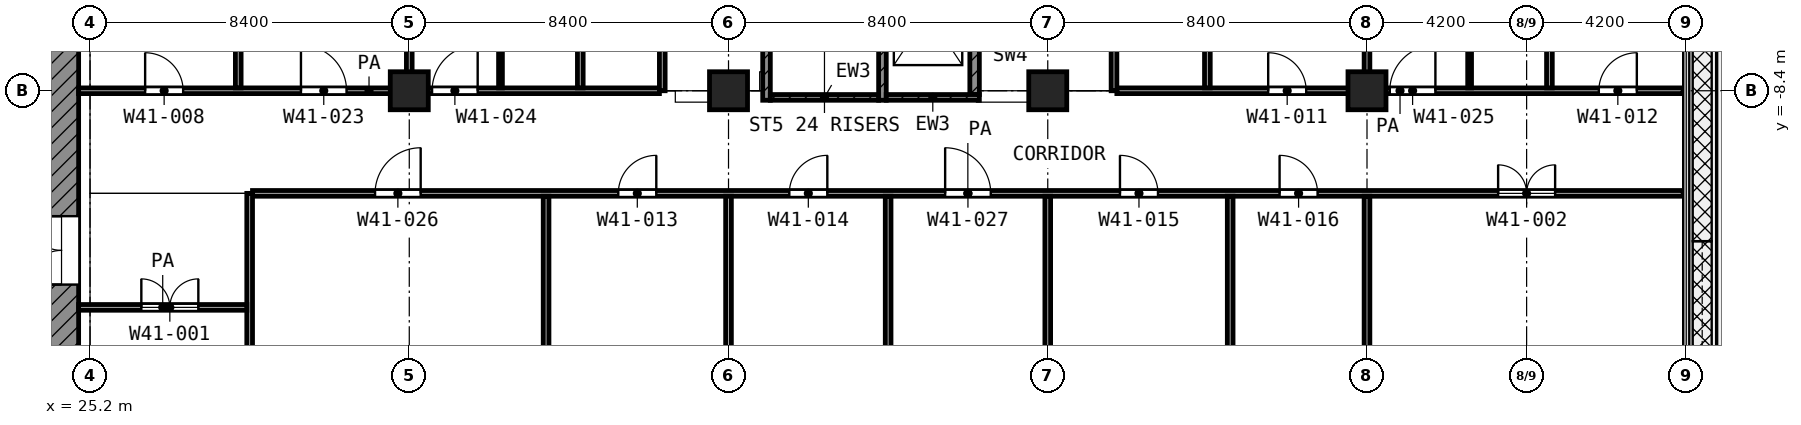
"""IFC4 building model, lengths in metres.
Left out: names, types, materials, properties, quantities, classifications, styles, units other than length and angle.
Written with IfcOpenShell. Run it as: python <this file> out.ifc"""

import sys

from ifc_helpers import new_model, si_unit, direction, frame, frame_2d, origin, origin_2d, place, context, subcontext, project, spatial, rectangle, extrude, element, fill, save


model = new_model("IFC4")
c1 = context("Model", 3, precision=1e-05, world=origin(), true_north=direction((0.0, 1.0)))
c2 = subcontext(c1, "Body", "Model", "MODEL_VIEW")
j1 = project(units=[si_unit("LENGTHUNIT", "METRE"), si_unit("PLANEANGLEUNIT", "RADIAN")], contexts=[c1])
p1 = place(None, origin())
s1 = spatial("IfcSite", under=j1, at=p1, CompositionType="ELEMENT")
p2 = place(p1, origin())
s2 = spatial("IfcBuilding", under=s1, at=p2, CompositionType="ELEMENT")
p3 = place(p2, frame((0.0, 0.0, 200.4)))
s3 = spatial("IfcBuildingStorey", under=s2, at=p3, CompositionType="ELEMENT", Elevation=200.4)
for number, where, z_axis, x_axis in (
    (1, (33.6, -8.4, 0.0), (0.0, 0.0, 1.0), (1.0, 0.0, 0.0)),
    (2, (42.0, -8.4, 0.0), (0.0, 0.0, 1.0), (1.0, 0.0, 0.0)),
    (3, (50.4, -8.4, 0.0), (0.0, 0.0, 1.0), (1.0, 0.0, 0.0)),
    (4, (58.8, -8.4, 0.0), (0.0, 0.0, 1.0), (1.0, 0.0, 0.0)),
):
    element("IfcColumn", number, at=place(p3, frame(where, z_axis=z_axis, x_axis=x_axis)), inside=s3, PredefinedType="COLUMN", context=c2, shape_type="SweptSolid", body=[
        extrude(rectangle(XDim=1.0, YDim=1.0, at=origin_2d()), origin(), (0.0, 0.0, 1.0), 4.2),
    ])
p4 = place(p3, frame((24.45, -24.0, 0.0), z_axis=(0.0, 0.0, 1.0), x_axis=(0.0, 1.0, 0.0)))
e5 = element("IfcWall", 5, at=p4, inside=s3, PredefinedType="SHEAR", context=c2, shape_type="SweptSolid", body=[
    extrude(rectangle(XDim=18.6, YDim=0.9, at=frame_2d((9.3, 0.0))), origin(), (0.0, 0.0, 1.0), 3.6),
])
p5 = place(p4, frame((10.5, 0.0, 0.0)))
e6 = element("IfcOpeningElement", 6, at=p5, cuts=e5, PredefinedType="OPENING", context=c2, shape_type="SweptSolid", body=[
    extrude(rectangle(XDim=1.8, YDim=2.1, at=frame_2d((0.9, 1.05))), frame((0.0, 0.46, 0.0), z_axis=(0.0, -1.0, 0.0), x_axis=(1.0, 0.0, 0.0)), (0.0, 0.0, 1.0), 0.92),
])
p6 = place(p3, frame((43.0, -8.65, 0.0), z_axis=(0.0, 0.0, 1.0), x_axis=(0.0, 1.0, 0.0)))
e7 = element("IfcWall", 7, at=p6, inside=s3, PredefinedType="SHEAR", context=c2, shape_type="SweptSolid", body=[
    extrude(rectangle(XDim=8.35, YDim=0.2, at=frame_2d((4.175, 0.0))), origin(), (0.0, 0.0, 1.0), 3.6),
])
p7 = place(p6, frame((7.0, 0.0, 0.0)))
e8 = element("IfcOpeningElement", 8, at=p7, cuts=e7, PredefinedType="OPENING", context=c2, shape_type="SweptSolid", body=[
    extrude(rectangle(XDim=1.1, YDim=2.1, at=frame_2d((0.55, 1.05))), frame((0.0, 0.11, 0.0), z_axis=(0.0, -1.0, 0.0), x_axis=(1.0, 0.0, 0.0)), (0.0, 0.0, 1.0), 0.22),
])
p8 = place(p3, frame((46.05, -8.65, 0.0), z_axis=(0.0, 0.0, 1.0), x_axis=(0.0, 1.0, 0.0)))
e9 = element("IfcWall", 9, at=p8, inside=s3, PredefinedType="SHEAR", context=c2, shape_type="SweptSolid", body=[
    extrude(rectangle(XDim=8.35, YDim=0.2, at=frame_2d((4.175, 0.0))), origin(), (0.0, 0.0, 1.0), 3.6),
])
p9 = place(p8, frame((7.0, 0.0, 0.0)))
e10 = element("IfcOpeningElement", 10, at=p9, cuts=e9, PredefinedType="OPENING", context=c2, shape_type="SweptSolid", body=[
    extrude(rectangle(XDim=1.1, YDim=2.1, at=frame_2d((0.55, 1.05))), frame((0.0, 0.11, 0.0), z_axis=(0.0, -1.0, 0.0), x_axis=(1.0, 0.0, 0.0)), (0.0, 0.0, 1.0), 0.22),
])
p10 = place(p3, frame((43.1, -8.575, 0.0), z_axis=(0.0, 0.0, 1.0), x_axis=(1.0, 0.0, 0.0)))
e11 = element("IfcWall", 11, at=p10, inside=s3, PredefinedType="SHEAR", context=c2, shape_type="SweptSolid", body=[
    extrude(rectangle(XDim=2.85, YDim=0.15, at=frame_2d((1.425, 0.0))), origin(), (0.0, 0.0, 1.0), 3.6),
])
p11 = place(p3, frame((46.15, -8.575, 0.0), z_axis=(0.0, 0.0, 1.0), x_axis=(1.0, 0.0, 0.0)))
e12 = element("IfcWall", 12, at=p11, inside=s3, PredefinedType="SHEAR", context=c2, shape_type="SweptSolid", body=[
    extrude(rectangle(XDim=2.45, YDim=0.15, at=frame_2d((1.225, 0.0))), origin(), (0.0, 0.0, 1.0), 3.6),
])
p12 = place(p3, frame((48.475, -8.5, 0.0), z_axis=(0.0, 0.0, 1.0), x_axis=(0.0, 1.0, 0.0)))
e13 = element("IfcWall", 13, at=p12, inside=s3, PredefinedType="SHEAR", context=c2, shape_type="SweptSolid", body=[
    extrude(rectangle(XDim=3.475, YDim=0.25, at=frame_2d((1.738, 0.0))), origin(), (0.0, 0.0, 1.0), 3.6),
])
for number, where, z_axis, x_axis in (
    (14, (36.0, -8.325, 0.0), (0.0, 0.0, 1.0), (0.0, 1.0, 0.0)),
    (15, (61.5, -8.325, 0.0), (0.0, 0.0, 1.0), (0.0, 1.0, 0.0)),
):
    element("IfcWall", number, at=place(p3, frame(where, z_axis=z_axis, x_axis=x_axis)), inside=s3, PredefinedType="PARTITIONING", context=c2, shape_type="SweptSolid", body=[
        extrude(rectangle(XDim=2.625, YDim=0.1, at=frame_2d((1.312, 0.0))), origin(), (0.0, 0.0, 1.0), 3.6),
    ])
p13 = place(p3, frame((24.9, -14.1, 0.0), z_axis=(0.0, 0.0, 1.0), x_axis=(1.0, 0.0, 0.0)))
e16 = element("IfcWall", 16, at=p13, inside=s3, PredefinedType="PARTITIONING", context=c2, shape_type="SweptSolid", body=[
    extrude(rectangle(XDim=4.425, YDim=0.15, at=frame_2d((2.212, 0.0))), origin(), (0.0, 0.0, 1.0), 3.6),
])
p14 = place(p13, frame((1.65, 0.0, 0.0)))
e17 = element("IfcOpeningElement", 17, at=p14, cuts=e16, PredefinedType="OPENING", context=c2, shape_type="SweptSolid", body=[
    extrude(rectangle(XDim=1.5, YDim=2.1, at=frame_2d((0.75, 1.05))), frame((0.0, 0.085, 0.0), z_axis=(0.0, -1.0, 0.0), x_axis=(1.0, 0.0, 0.0)), (0.0, 0.0, 1.0), 0.17),
])
p15 = place(p3, frame((29.475, -11.1, 0.0), z_axis=(0.0, 0.0, 1.0), x_axis=(1.0, 0.0, 0.0)))
e18 = element("IfcWall", 18, at=p15, inside=s3, PredefinedType="PARTITIONING", context=c2, shape_type="SweptSolid", body=[
    extrude(rectangle(XDim=37.645, YDim=0.15, at=frame_2d((18.823, 0.0))), origin(), (0.0, 0.0, 1.0), 3.6),
])
p16 = place(p15, frame((3.225, 0.0, 0.0)))
e19 = element("IfcOpeningElement", 19, at=p16, cuts=e18, PredefinedType="OPENING", context=c2, shape_type="SweptSolid", body=[
    extrude(rectangle(XDim=1.2, YDim=2.1, at=frame_2d((0.6, 1.05))), frame((0.0, 0.085, 0.0), z_axis=(0.0, -1.0, 0.0), x_axis=(1.0, 0.0, 0.0)), (0.0, 0.0, 1.0), 0.17),
])
p17 = place(p15, frame((9.625, 0.0, 0.0)))
e20 = element("IfcOpeningElement", 20, at=p17, cuts=e18, PredefinedType="OPENING", context=c2, shape_type="SweptSolid", body=[
    extrude(rectangle(XDim=1.0, YDim=2.1, at=frame_2d((0.5, 1.05))), frame((0.0, 0.085, 0.0), z_axis=(0.0, -1.0, 0.0), x_axis=(1.0, 0.0, 0.0)), (0.0, 0.0, 1.0), 0.17),
])
p18 = place(p15, frame((14.125, 0.0, 0.0)))
e21 = element("IfcOpeningElement", 21, at=p18, cuts=e18, PredefinedType="OPENING", context=c2, shape_type="SweptSolid", body=[
    extrude(rectangle(XDim=1.0, YDim=2.1, at=frame_2d((0.5, 1.05))), frame((0.0, 0.085, 0.0), z_axis=(0.0, -1.0, 0.0), x_axis=(1.0, 0.0, 0.0)), (0.0, 0.0, 1.0), 0.17),
])
p19 = place(p15, frame((18.225, 0.0, 0.0)))
e22 = element("IfcOpeningElement", 22, at=p19, cuts=e18, PredefinedType="OPENING", context=c2, shape_type="SweptSolid", body=[
    extrude(rectangle(XDim=1.2, YDim=2.1, at=frame_2d((0.6, 1.05))), frame((0.0, 0.085, 0.0), z_axis=(0.0, -1.0, 0.0), x_axis=(1.0, 0.0, 0.0)), (0.0, 0.0, 1.0), 0.17),
])
p20 = place(p15, frame((22.825, 0.0, 0.0)))
e23 = element("IfcOpeningElement", 23, at=p20, cuts=e18, PredefinedType="OPENING", context=c2, shape_type="SweptSolid", body=[
    extrude(rectangle(XDim=1.0, YDim=2.1, at=frame_2d((0.5, 1.05))), frame((0.0, 0.085, 0.0), z_axis=(0.0, -1.0, 0.0), x_axis=(1.0, 0.0, 0.0)), (0.0, 0.0, 1.0), 0.17),
])
p21 = place(p15, frame((27.025, 0.0, 0.0)))
e24 = element("IfcOpeningElement", 24, at=p21, cuts=e18, PredefinedType="OPENING", context=c2, shape_type="SweptSolid", body=[
    extrude(rectangle(XDim=1.0, YDim=2.1, at=frame_2d((0.5, 1.05))), frame((0.0, 0.085, 0.0), z_axis=(0.0, -1.0, 0.0), x_axis=(1.0, 0.0, 0.0)), (0.0, 0.0, 1.0), 0.17),
])
p22 = place(p15, frame((32.775, 0.0, 0.0)))
e25 = element("IfcOpeningElement", 25, at=p22, cuts=e18, PredefinedType="OPENING", context=c2, shape_type="SweptSolid", body=[
    extrude(rectangle(XDim=1.5, YDim=2.1, at=frame_2d((0.75, 1.05))), frame((0.0, 0.085, 0.0), z_axis=(0.0, -1.0, 0.0), x_axis=(1.0, 0.0, 0.0)), (0.0, 0.0, 1.0), 0.17),
])
p23 = place(p3, frame((24.9, -8.4, 0.0), z_axis=(0.0, 0.0, 1.0), x_axis=(1.0, 0.0, 0.0)))
e26 = element("IfcWall", 26, at=p23, inside=s3, PredefinedType="PARTITIONING", context=c2, shape_type="SweptSolid", body=[
    extrude(rectangle(XDim=15.282, YDim=0.15, at=frame_2d((7.641, 0.0))), origin(), (0.0, 0.0, 1.0), 3.6),
])
p24 = place(p23, frame((1.75, 0.0, 0.0)))
e27 = element("IfcOpeningElement", 27, at=p24, cuts=e26, PredefinedType="OPENING", context=c2, shape_type="SweptSolid", body=[
    extrude(rectangle(XDim=1.0, YDim=2.1, at=frame_2d((0.5, 1.05))), frame((0.0, 0.085, 0.0), z_axis=(0.0, -1.0, 0.0), x_axis=(1.0, 0.0, 0.0)), (0.0, 0.0, 1.0), 0.17),
])
p25 = place(p23, frame((5.85, 0.0, 0.0)))
e28 = element("IfcOpeningElement", 28, at=p25, cuts=e26, PredefinedType="OPENING", context=c2, shape_type="SweptSolid", body=[
    extrude(rectangle(XDim=1.2, YDim=2.1, at=frame_2d((0.6, 1.05))), frame((0.0, 0.085, 0.0), z_axis=(0.0, -1.0, 0.0), x_axis=(1.0, 0.0, 0.0)), (0.0, 0.0, 1.0), 0.17),
])
p26 = place(p23, frame((9.3, 0.0, 0.0)))
e29 = element("IfcOpeningElement", 29, at=p26, cuts=e26, PredefinedType="OPENING", context=c2, shape_type="SweptSolid", body=[
    extrude(rectangle(XDim=1.2, YDim=2.1, at=frame_2d((0.6, 1.05))), frame((0.0, 0.085, 0.0), z_axis=(0.0, -1.0, 0.0), x_axis=(1.0, 0.0, 0.0)), (0.0, 0.0, 1.0), 0.17),
])
p27 = place(p3, frame((52.218, -8.4, 0.0), z_axis=(0.0, 0.0, 1.0), x_axis=(1.0, 0.0, 0.0)))
e30 = element("IfcWall", 30, at=p27, inside=s3, PredefinedType="PARTITIONING", context=c2, shape_type="SweptSolid", body=[
    extrude(rectangle(XDim=14.902, YDim=0.15, at=frame_2d((7.451, 0.0))), origin(), (0.0, 0.0, 1.0), 3.6),
])
p28 = place(p27, frame((3.982, 0.0, 0.0)))
e31 = element("IfcOpeningElement", 31, at=p28, cuts=e30, PredefinedType="OPENING", context=c2, shape_type="SweptSolid", body=[
    extrude(rectangle(XDim=1.0, YDim=2.1, at=frame_2d((0.5, 1.05))), frame((0.0, 0.085, 0.0), z_axis=(0.0, -1.0, 0.0), x_axis=(1.0, 0.0, 0.0)), (0.0, 0.0, 1.0), 0.17),
])
p29 = place(p27, frame((7.182, 0.0, 0.0)))
e32 = element("IfcOpeningElement", 32, at=p29, cuts=e30, PredefinedType="OPENING", context=c2, shape_type="SweptSolid", body=[
    extrude(rectangle(XDim=1.2, YDim=2.1, at=frame_2d((0.6, 1.05))), frame((0.0, 0.085, 0.0), z_axis=(0.0, -1.0, 0.0), x_axis=(1.0, 0.0, 0.0)), (0.0, 0.0, 1.0), 0.17),
])
p30 = place(p27, frame((12.682, 0.0, 0.0)))
e33 = element("IfcOpeningElement", 33, at=p30, cuts=e30, PredefinedType="OPENING", context=c2, shape_type="SweptSolid", body=[
    extrude(rectangle(XDim=1.0, YDim=2.1, at=frame_2d((0.5, 1.05))), frame((0.0, 0.085, 0.0), z_axis=(0.0, -1.0, 0.0), x_axis=(1.0, 0.0, 0.0)), (0.0, 0.0, 1.0), 0.17),
])
p31 = place(p3, frame((29.1, -8.325, 0.0), z_axis=(0.0, 0.0, 1.0), x_axis=(0.0, 1.0, 0.0)))
e34 = element("IfcWall", 34, at=p31, inside=s3, PredefinedType="PARTITIONING", context=c2, shape_type="SweptSolid", body=[
    extrude(rectangle(XDim=8.245, YDim=0.15, at=frame_2d((4.123, 0.0))), origin(), (0.0, 0.0, 1.0), 2.7),
])
p32 = place(p3, frame((29.4, -31.198, 0.0), z_axis=(0.0, 0.0, 1.0), x_axis=(0.0, 1.0, 0.0)))
e35 = element("IfcWall", 35, at=p32, inside=s3, PredefinedType="PARTITIONING", context=c2, shape_type="SweptSolid", body=[
    extrude(rectangle(XDim=20.098, YDim=0.15, at=frame_2d((10.049, 0.0))), origin(), (0.0, 0.0, 1.0), 3.6),
])
p33 = place(p3, frame((33.6, -8.325, 0.0), z_axis=(0.0, 0.0, 1.0), x_axis=(0.0, 1.0, 0.0)))
e36 = element("IfcWall", 36, at=p33, inside=s3, PredefinedType="PARTITIONING", context=c2, shape_type="SweptSolid", body=[
    extrude(rectangle(XDim=8.245, YDim=0.15, at=frame_2d((4.123, 0.0))), origin(), (0.0, 0.0, 1.0), 3.6),
])
p34 = place(p3, frame((37.2, -31.12, 0.0), z_axis=(0.0, 0.0, 1.0), x_axis=(0.0, 1.0, 0.0)))
e37 = element("IfcWall", 37, at=p34, inside=s3, PredefinedType="PARTITIONING", context=c2, shape_type="SweptSolid", body=[
    extrude(rectangle(XDim=19.945, YDim=0.15, at=frame_2d((9.973, 0.0))), origin(), (0.0, 0.0, 1.0), 3.6),
])
p35 = place(p3, frame((38.1, -8.325, 0.0), z_axis=(0.0, 0.0, 1.0), x_axis=(0.0, 1.0, 0.0)))
e38 = element("IfcWall", 38, at=p35, inside=s3, PredefinedType="PARTITIONING", context=c2, shape_type="SweptSolid", body=[
    extrude(rectangle(XDim=8.245, YDim=0.15, at=frame_2d((4.123, 0.0))), origin(), (0.0, 0.0, 1.0), 2.7),
])
p36 = place(p3, frame((40.257, -8.4, 0.0), z_axis=(0.0, 0.0, 1.0), x_axis=(0.0, 1.0, 0.0)))
e39 = element("IfcWall", 39, at=p36, inside=s3, PredefinedType="PARTITIONING", context=c2, shape_type="SweptSolid", body=[
    extrude(rectangle(XDim=8.048, YDim=0.15, at=frame_2d((4.024, 0.0))), origin(), (0.0, 0.0, 1.0), 3.6),
])
p37 = place(p36, frame((3.574, 0.0, 0.0)))
e40 = element("IfcOpeningElement", 40, at=p37, cuts=e39, PredefinedType="OPENING", context=c2, shape_type="SweptSolid", body=[
    extrude(rectangle(XDim=0.9, YDim=2.1, at=frame_2d((0.45, 1.05))), frame((0.0, 0.085, 0.0), z_axis=(0.0, -1.0, 0.0), x_axis=(1.0, 0.0, 0.0)), (0.0, 0.0, 1.0), 0.17),
])
for number, where, z_axis, x_axis in (
    (41, (42.0, -31.12, 0.0), (0.0, 0.0, 1.0), (0.0, 1.0, 0.0)),
    (42, (46.2, -31.12, 0.0), (0.0, 0.0, 1.0), (0.0, 1.0, 0.0)),
    (43, (50.4, -31.12, 0.0), (0.0, 0.0, 1.0), (0.0, 1.0, 0.0)),
):
    element("IfcWall", number, at=place(p3, frame(where, z_axis=z_axis, x_axis=x_axis)), inside=s3, PredefinedType="PARTITIONING", context=c2, shape_type="SweptSolid", body=[
        extrude(rectangle(XDim=19.945, YDim=0.15, at=frame_2d((9.973, 0.0))), origin(), (0.0, 0.0, 1.0), 3.6),
    ])
p38 = place(p3, frame((52.143, -8.4, 0.0), z_axis=(0.0, 0.0, 1.0), x_axis=(0.0, 1.0, 0.0)))
e44 = element("IfcWall", 44, at=p38, inside=s3, PredefinedType="PARTITIONING", context=c2, shape_type="SweptSolid", body=[
    extrude(rectangle(XDim=6.549, YDim=0.15, at=frame_2d((3.274, 0.0))), origin(), (0.0, 0.0, 1.0), 3.6),
])
p39 = place(p38, frame((2.774, 0.0, 0.0)))
e45 = element("IfcOpeningElement", 45, at=p39, cuts=e44, PredefinedType="OPENING", context=c2, shape_type="SweptSolid", body=[
    extrude(rectangle(XDim=1.0, YDim=2.1, at=frame_2d((0.5, 1.05))), frame((0.0, 0.085, 0.0), z_axis=(0.0, -1.0, 0.0), x_axis=(1.0, 0.0, 0.0)), (0.0, 0.0, 1.0), 0.17),
])
p40 = place(p3, frame((54.6, -8.325, 0.0), z_axis=(0.0, 0.0, 1.0), x_axis=(0.0, 1.0, 0.0)))
e46 = element("IfcWall", 46, at=p40, inside=s3, PredefinedType="PARTITIONING", context=c2, shape_type="SweptSolid", body=[
    extrude(rectangle(XDim=8.245, YDim=0.15, at=frame_2d((4.123, 0.0))), origin(), (0.0, 0.0, 1.0), 2.7),
])
for number, where, z_axis, x_axis in (
    (47, (55.2, -31.12, 0.0), (0.0, 0.0, 1.0), (0.0, 1.0, 0.0)),
    (48, (58.8, -31.12, 0.0), (0.0, 0.0, 1.0), (0.0, 1.0, 0.0)),
):
    element("IfcWall", number, at=place(p3, frame(where, z_axis=z_axis, x_axis=x_axis)), inside=s3, PredefinedType="PARTITIONING", context=c2, shape_type="SweptSolid", body=[
        extrude(rectangle(XDim=19.945, YDim=0.15, at=frame_2d((9.973, 0.0))), origin(), (0.0, 0.0, 1.0), 3.6),
    ])
p41 = place(p3, frame((58.8, -8.325, 0.0), z_axis=(0.0, 0.0, 1.0), x_axis=(0.0, 1.0, 0.0)))
e49 = element("IfcWall", 49, at=p41, inside=s3, PredefinedType="PARTITIONING", context=c2, shape_type="SweptSolid", body=[
    extrude(rectangle(XDim=8.245, YDim=0.15, at=frame_2d((4.123, 0.0))), origin(), (0.0, 0.0, 1.0), 2.7),
])
p42 = place(p3, frame((63.6, -8.325, 0.0), z_axis=(0.0, 0.0, 1.0), x_axis=(0.0, 1.0, 0.0)))
e50 = element("IfcWall", 50, at=p42, inside=s3, PredefinedType="PARTITIONING", context=c2, shape_type="SweptSolid", body=[
    extrude(rectangle(XDim=5.812, YDim=0.15, at=frame_2d((2.906, 0.0))), origin(), (0.0, 0.0, 1.0), 2.7),
])
p43 = place(p5, origin())
e51 = element("IfcDoor", 51, at=p43, inside=s3, OperationType="DOUBLE_DOOR_SINGLE_SWING", PredefinedType="DOOR", context=c2, shape_type="SweptSolid", body=[
    extrude(rectangle(XDim=1.8, YDim=2.1, at=frame_2d((0.9, 1.05))), frame((0.0, 0.025, 0.0), z_axis=(0.0, -1.0, 0.0), x_axis=(1.0, 0.0, 0.0)), (0.0, 0.0, 1.0), 0.05),
])
fill(e6, e51)
p44 = place(p14, origin())
e52 = element("IfcDoor", 52, at=p44, inside=s3, OperationType="DOUBLE_DOOR_SINGLE_SWING", PredefinedType="DOOR", context=c2, shape_type="SweptSolid", body=[
    extrude(rectangle(XDim=1.5, YDim=2.1, at=frame_2d((0.75, 1.05))), frame((0.0, 0.025, 0.0), z_axis=(0.0, -1.0, 0.0), x_axis=(1.0, 0.0, 0.0)), (0.0, 0.0, 1.0), 0.05),
])
fill(e17, e52)
p45 = place(p24, origin())
e53 = element("IfcDoor", 53, at=p45, inside=s3, OperationType="SINGLE_SWING_LEFT", PredefinedType="DOOR", context=c2, shape_type="SweptSolid", body=[
    extrude(rectangle(XDim=1.0, YDim=2.1, at=frame_2d((0.5, 1.05))), frame((0.0, 0.025, 0.0), z_axis=(0.0, -1.0, 0.0), x_axis=(1.0, 0.0, 0.0)), (0.0, 0.0, 1.0), 0.05),
])
fill(e27, e53)
p46 = place(p25, origin())
e54 = element("IfcDoor", 54, at=p46, inside=s3, OperationType="SINGLE_SWING_LEFT", PredefinedType="DOOR", context=c2, shape_type="SweptSolid", body=[
    extrude(rectangle(XDim=1.2, YDim=2.1, at=frame_2d((0.6, 1.05))), frame((0.0, 0.025, 0.0), z_axis=(0.0, -1.0, 0.0), x_axis=(1.0, 0.0, 0.0)), (0.0, 0.0, 1.0), 0.05),
])
fill(e28, e54)
p47 = place(p26, origin())
e55 = element("IfcDoor", 55, at=p47, inside=s3, OperationType="SINGLE_SWING_RIGHT", PredefinedType="DOOR", context=c2, shape_type="SweptSolid", body=[
    extrude(rectangle(XDim=1.2, YDim=2.1, at=frame_2d((0.6, 1.05))), frame((0.0, 0.025, 0.0), z_axis=(0.0, -1.0, 0.0), x_axis=(1.0, 0.0, 0.0)), (0.0, 0.0, 1.0), 0.05),
])
fill(e29, e55)
p48 = place(p28, origin())
e56 = element("IfcDoor", 56, at=p48, inside=s3, OperationType="SINGLE_SWING_LEFT", PredefinedType="DOOR", context=c2, shape_type="SweptSolid", body=[
    extrude(rectangle(XDim=1.0, YDim=2.1, at=frame_2d((0.5, 1.05))), frame((0.0, 0.025, 0.0), z_axis=(0.0, -1.0, 0.0), x_axis=(1.0, 0.0, 0.0)), (0.0, 0.0, 1.0), 0.05),
])
fill(e31, e56)
p49 = place(p29, origin())
e57 = element("IfcDoor", 57, at=p49, inside=s3, OperationType="SINGLE_SWING_RIGHT", PredefinedType="DOOR", context=c2, shape_type="SweptSolid", body=[
    extrude(rectangle(XDim=1.2, YDim=2.1, at=frame_2d((0.6, 1.05))), frame((0.0, 0.025, 0.0), z_axis=(0.0, -1.0, 0.0), x_axis=(1.0, 0.0, 0.0)), (0.0, 0.0, 1.0), 0.05),
])
fill(e32, e57)
p50 = place(p30, origin())
e58 = element("IfcDoor", 58, at=p50, inside=s3, OperationType="SINGLE_SWING_RIGHT", PredefinedType="DOOR", context=c2, shape_type="SweptSolid", body=[
    extrude(rectangle(XDim=1.0, YDim=2.1, at=frame_2d((0.5, 1.05))), frame((0.0, 0.025, 0.0), z_axis=(0.0, -1.0, 0.0), x_axis=(1.0, 0.0, 0.0)), (0.0, 0.0, 1.0), 0.05),
])
fill(e33, e58)
p51 = place(p16, origin())
e59 = element("IfcDoor", 59, at=p51, inside=s3, OperationType="SINGLE_SWING_RIGHT", PredefinedType="DOOR", context=c2, shape_type="SweptSolid", body=[
    extrude(rectangle(XDim=1.2, YDim=2.1, at=frame_2d((0.6, 1.05))), frame((0.0, 0.025, 0.0), z_axis=(0.0, -1.0, 0.0), x_axis=(1.0, 0.0, 0.0)), (0.0, 0.0, 1.0), 0.05),
])
fill(e19, e59)
p52 = place(p17, origin())
e60 = element("IfcDoor", 60, at=p52, inside=s3, OperationType="SINGLE_SWING_RIGHT", PredefinedType="DOOR", context=c2, shape_type="SweptSolid", body=[
    extrude(rectangle(XDim=1.0, YDim=2.1, at=frame_2d((0.5, 1.05))), frame((0.0, 0.025, 0.0), z_axis=(0.0, -1.0, 0.0), x_axis=(1.0, 0.0, 0.0)), (0.0, 0.0, 1.0), 0.05),
])
fill(e20, e60)
p53 = place(p18, origin())
e61 = element("IfcDoor", 61, at=p53, inside=s3, OperationType="SINGLE_SWING_RIGHT", PredefinedType="DOOR", context=c2, shape_type="SweptSolid", body=[
    extrude(rectangle(XDim=1.0, YDim=2.1, at=frame_2d((0.5, 1.05))), frame((0.0, 0.025, 0.0), z_axis=(0.0, -1.0, 0.0), x_axis=(1.0, 0.0, 0.0)), (0.0, 0.0, 1.0), 0.05),
])
fill(e21, e61)
p54 = place(p19, origin())
e62 = element("IfcDoor", 62, at=p54, inside=s3, OperationType="SINGLE_SWING_LEFT", PredefinedType="DOOR", context=c2, shape_type="SweptSolid", body=[
    extrude(rectangle(XDim=1.2, YDim=2.1, at=frame_2d((0.6, 1.05))), frame((0.0, 0.025, 0.0), z_axis=(0.0, -1.0, 0.0), x_axis=(1.0, 0.0, 0.0)), (0.0, 0.0, 1.0), 0.05),
])
fill(e22, e62)
p55 = place(p20, origin())
e63 = element("IfcDoor", 63, at=p55, inside=s3, OperationType="SINGLE_SWING_LEFT", PredefinedType="DOOR", context=c2, shape_type="SweptSolid", body=[
    extrude(rectangle(XDim=1.0, YDim=2.1, at=frame_2d((0.5, 1.05))), frame((0.0, 0.025, 0.0), z_axis=(0.0, -1.0, 0.0), x_axis=(1.0, 0.0, 0.0)), (0.0, 0.0, 1.0), 0.05),
])
fill(e23, e63)
p56 = place(p21, origin())
e64 = element("IfcDoor", 64, at=p56, inside=s3, OperationType="SINGLE_SWING_LEFT", PredefinedType="DOOR", context=c2, shape_type="SweptSolid", body=[
    extrude(rectangle(XDim=1.0, YDim=2.1, at=frame_2d((0.5, 1.05))), frame((0.0, 0.025, 0.0), z_axis=(0.0, -1.0, 0.0), x_axis=(1.0, 0.0, 0.0)), (0.0, 0.0, 1.0), 0.05),
])
fill(e24, e64)
p57 = place(p22, origin())
e65 = element("IfcDoor", 65, at=p57, inside=s3, OperationType="DOUBLE_DOOR_SINGLE_SWING", PredefinedType="DOOR", context=c2, shape_type="SweptSolid", body=[
    extrude(rectangle(XDim=1.5, YDim=2.1, at=frame_2d((0.75, 1.05))), frame((0.0, 0.025, 0.0), z_axis=(0.0, -1.0, 0.0), x_axis=(1.0, 0.0, 0.0)), (0.0, 0.0, 1.0), 0.05),
])
fill(e25, e65)
save(model, sys.argv[1])
